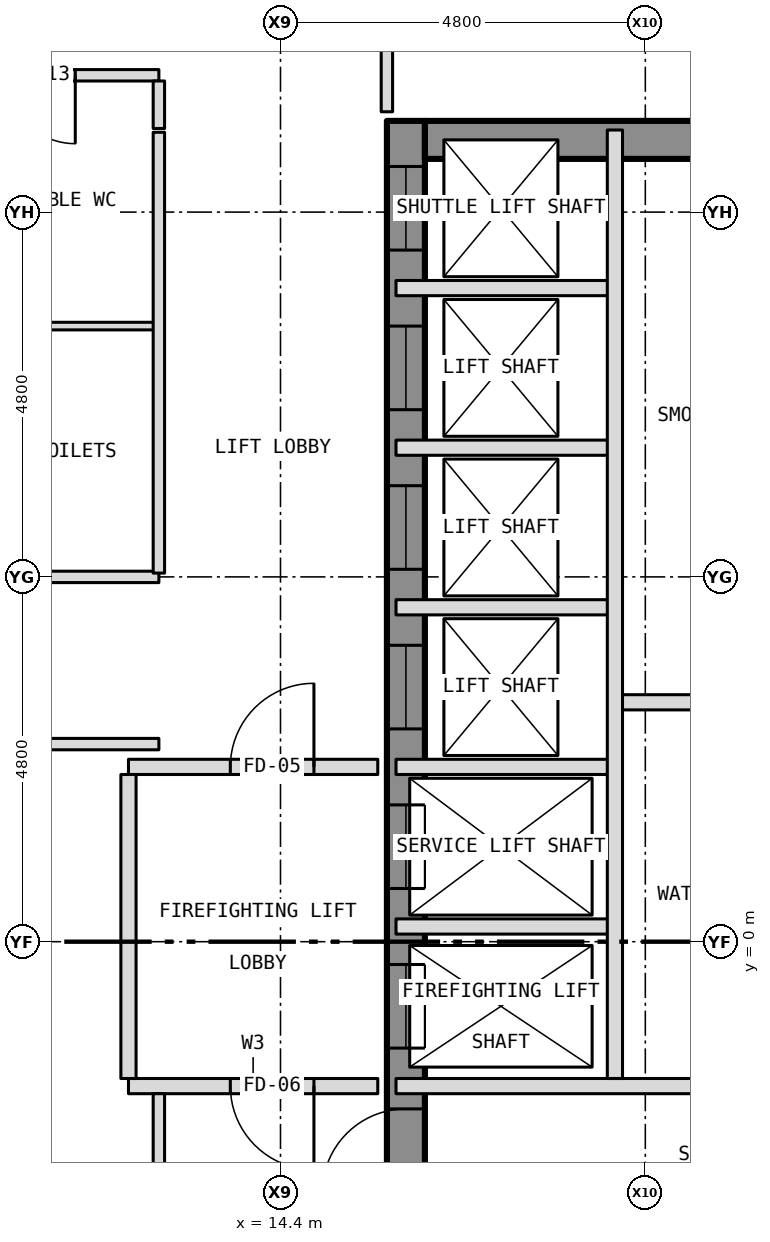
"""IFC4 building model, lengths in metres.
Left out: names, types, materials, properties, quantities, classifications, styles, units other than length and angle.
Written with IfcOpenShell. Run it as: python <this file> out.ifc"""

import sys

from ifc_helpers import new_model, si_unit, direction, frame, frame_2d, origin, place, context, subcontext, project, spatial, rectangle, extrude, element, fill, save


model = new_model("IFC4")
c1 = context("Model", 3, precision=1e-05, world=origin(), true_north=direction((0.0, 1.0)))
c2 = subcontext(c1, "Body", "Model", "MODEL_VIEW")
j1 = project(units=[si_unit("LENGTHUNIT", "METRE"), si_unit("PLANEANGLEUNIT", "RADIAN")], contexts=[c1])
p1 = place(None, origin())
s1 = spatial("IfcSite", under=j1, at=p1, CompositionType="ELEMENT")
p2 = place(p1, origin())
s2 = spatial("IfcBuilding", under=s1, at=p2, CompositionType="ELEMENT")
p3 = place(p2, frame((0.0, 0.0, 142.5)))
s3 = spatial("IfcBuildingStorey", under=s2, at=p3, CompositionType="ELEMENT", Elevation=142.5)
p4 = place(p3, frame((16.05, -10.8, 0.0), z_axis=(0.0, 0.0, 1.0), x_axis=(0.0, 1.0, 0.0)))
e1 = element("IfcWall", 1, at=p4, inside=s3, PredefinedType="SHEAR", context=c2, shape_type="SweptSolid", body=[
    extrude(rectangle(XDim=21.6, YDim=0.5, at=frame_2d((10.8, 0.0))), origin(), (0.0, 0.0, 1.0), 5.25),
])
p5 = place(p4, frame((9.4, 0.0, 0.0)))
e2 = element("IfcOpeningElement", 2, at=p5, cuts=e1, PredefinedType="OPENING", context=c2, shape_type="SweptSolid", body=[
    extrude(rectangle(XDim=1.1, YDim=2.1, at=frame_2d((0.55, 1.05))), frame((0.0, 0.262, 0.0), z_axis=(0.0, -1.0, 0.0), x_axis=(1.0, 0.0, 0.0)), (0.0, 0.0, 1.0), 0.524),
])
p6 = place(p4, frame((11.5, 0.0, 0.0)))
e3 = element("IfcOpeningElement", 3, at=p6, cuts=e1, PredefinedType="OPENING", context=c2, shape_type="SweptSolid", body=[
    extrude(rectangle(XDim=1.1, YDim=2.1, at=frame_2d((0.55, 1.05))), frame((0.0, 0.262, 0.0), z_axis=(0.0, -1.0, 0.0), x_axis=(1.0, 0.0, 0.0)), (0.0, 0.0, 1.0), 0.524),
])
p7 = place(p4, frame((13.6, 0.0, 0.0)))
e4 = element("IfcOpeningElement", 4, at=p7, cuts=e1, PredefinedType="OPENING", context=c2, shape_type="SweptSolid", body=[
    extrude(rectangle(XDim=1.1, YDim=2.1, at=frame_2d((0.55, 1.05))), frame((0.0, 0.262, 0.0), z_axis=(0.0, -1.0, 0.0), x_axis=(1.0, 0.0, 0.0)), (0.0, 0.0, 1.0), 0.524),
])
p8 = place(p4, frame((15.7, 0.0, 0.0)))
e5 = element("IfcOpeningElement", 5, at=p8, cuts=e1, PredefinedType="OPENING", context=c2, shape_type="SweptSolid", body=[
    extrude(rectangle(XDim=1.1, YDim=2.1, at=frame_2d((0.55, 1.05))), frame((0.0, 0.262, 0.0), z_axis=(0.0, -1.0, 0.0), x_axis=(1.0, 0.0, 0.0)), (0.0, 0.0, 1.0), 0.524),
])
p9 = place(p4, frame((17.8, 0.0, 0.0)))
e6 = element("IfcOpeningElement", 6, at=p9, cuts=e1, PredefinedType="OPENING", context=c2, shape_type="SweptSolid", body=[
    extrude(rectangle(XDim=1.1, YDim=2.1, at=frame_2d((0.55, 1.05))), frame((0.0, 0.262, 0.0), z_axis=(0.0, -1.0, 0.0), x_axis=(1.0, 0.0, 0.0)), (0.0, 0.0, 1.0), 0.524),
])
p10 = place(p4, frame((19.9, 0.0, 0.0)))
e7 = element("IfcOpeningElement", 7, at=p10, cuts=e1, PredefinedType="OPENING", context=c2, shape_type="SweptSolid", body=[
    extrude(rectangle(XDim=1.1, YDim=2.1, at=frame_2d((0.55, 1.05))), frame((0.0, 0.262, 0.0), z_axis=(0.0, -1.0, 0.0), x_axis=(1.0, 0.0, 0.0)), (0.0, 0.0, 1.0), 0.524),
])
p11 = place(p4, frame((5.642, 0.0, 0.0)))
e8 = element("IfcOpeningElement", 8, at=p11, cuts=e1, PredefinedType="OPENING", context=c2, shape_type="SweptSolid", body=[
    extrude(rectangle(XDim=1.1, YDim=2.1, at=frame_2d((0.55, 1.05))), frame((0.0, 0.262, 0.0), z_axis=(0.0, -1.0, 0.0), x_axis=(1.0, 0.0, 0.0)), (0.0, 0.0, 1.0), 0.524),
])
p12 = place(p4, frame((7.5, 0.0, 0.0)))
e9 = element("IfcOpeningElement", 9, at=p12, cuts=e1, PredefinedType="OPENING", context=c2, shape_type="SweptSolid", body=[
    extrude(rectangle(XDim=1.1, YDim=2.1, at=frame_2d((0.55, 1.05))), frame((0.0, 0.262, 0.0), z_axis=(0.0, -1.0, 0.0), x_axis=(1.0, 0.0, 0.0)), (0.0, 0.0, 1.0), 0.524),
])
p13 = place(p3, frame((16.3, 10.55, 0.0), z_axis=(0.0, 0.0, 1.0), x_axis=(1.0, 0.0, 0.0)))
e10 = element("IfcWall", 10, at=p13, inside=s3, PredefinedType="SHEAR", context=c2, shape_type="SweptSolid", body=[
    extrude(rectangle(XDim=4.8, YDim=0.5, at=frame_2d((2.4, 0.0))), origin(), (0.0, 0.0, 1.0), 5.25),
])
p14 = place(p3, frame((12.4, -1.9, 0.0), z_axis=(0.0, 0.0, 1.0), x_axis=(1.0, 0.0, 0.0)))
e11 = element("IfcWall", 11, at=p14, inside=s3, PredefinedType="PARTITIONING", context=c2, shape_type="SweptSolid", body=[
    extrude(rectangle(XDim=3.28, YDim=0.2, at=frame_2d((1.64, 0.0))), origin(), (0.0, 0.0, 1.0), 5.35),
])
p15 = place(p14, frame((1.34, 0.0, 0.0)))
e12 = element("IfcOpeningElement", 12, at=p15, cuts=e11, PredefinedType="OPENING", context=c2, shape_type="SweptSolid", body=[
    extrude(rectangle(XDim=1.1, YDim=2.1, at=frame_2d((0.55, 1.05))), frame((0.0, 0.112, 0.0), z_axis=(0.0, -1.0, 0.0), x_axis=(1.0, 0.0, 0.0)), (0.0, 0.0, 1.0), 0.224),
])
p16 = place(p3, frame((15.92, -1.9, 0.0), z_axis=(0.0, 0.0, 1.0), x_axis=(1.0, 0.0, 0.0)))
e13 = element("IfcWall", 13, at=p16, inside=s3, PredefinedType="PARTITIONING", context=c2, shape_type="SweptSolid", body=[
    extrude(rectangle(XDim=5.56, YDim=0.2, at=frame_2d((2.78, 0.0))), origin(), (0.0, 0.0, 1.0), 5.25),
])
p17 = place(p3, frame((15.92, 0.2, 0.0), z_axis=(0.0, 0.0, 1.0), x_axis=(1.0, 0.0, 0.0)))
e14 = element("IfcWall", 14, at=p17, inside=s3, PredefinedType="PARTITIONING", context=c2, shape_type="SweptSolid", body=[
    extrude(rectangle(XDim=2.88, YDim=0.2, at=frame_2d((1.44, 0.0))), origin(), (0.0, 0.0, 1.0), 5.25),
])
p18 = place(p3, frame((12.4, 2.3, 0.0), z_axis=(0.0, 0.0, 1.0), x_axis=(1.0, 0.0, 0.0)))
e15 = element("IfcWall", 15, at=p18, inside=s3, PredefinedType="PARTITIONING", context=c2, shape_type="SweptSolid", body=[
    extrude(rectangle(XDim=3.28, YDim=0.2, at=frame_2d((1.64, 0.0))), origin(), (0.0, 0.0, 1.0), 5.35),
])
p19 = place(p18, frame((1.34, 0.0, 0.0)))
e16 = element("IfcOpeningElement", 16, at=p19, cuts=e15, PredefinedType="OPENING", context=c2, shape_type="SweptSolid", body=[
    extrude(rectangle(XDim=1.1, YDim=2.1, at=frame_2d((0.55, 1.05))), frame((0.0, 0.112, 0.0), z_axis=(0.0, -1.0, 0.0), x_axis=(1.0, 0.0, 0.0)), (0.0, 0.0, 1.0), 0.224),
])
p20 = place(p3, frame((15.92, 2.3, 0.0), z_axis=(0.0, 0.0, 1.0), x_axis=(1.0, 0.0, 0.0)))
e17 = element("IfcWall", 17, at=p20, inside=s3, PredefinedType="PARTITIONING", context=c2, shape_type="SweptSolid", body=[
    extrude(rectangle(XDim=2.88, YDim=0.2, at=frame_2d((1.44, 0.0))), origin(), (0.0, 0.0, 1.0), 5.25),
])
p21 = place(p3, frame((9.7, 2.6, 0.0), z_axis=(0.0, 0.0, 1.0), x_axis=(1.0, 0.0, 0.0)))
e18 = element("IfcWall", 18, at=p21, inside=s3, PredefinedType="PARTITIONING", context=c2, shape_type="SweptSolid", body=[
    extrude(rectangle(XDim=3.1, YDim=0.15, at=frame_2d((1.55, 0.0))), origin(), (0.0, 0.0, 1.0), 5.35),
])
p22 = place(p3, frame((18.8, 3.15, 0.0), z_axis=(0.0, 0.0, 1.0), x_axis=(1.0, 0.0, 0.0)))
e19 = element("IfcWall", 19, at=p22, inside=s3, PredefinedType="PARTITIONING", context=c2, shape_type="SweptSolid", body=[
    extrude(rectangle(XDim=2.68, YDim=0.2, at=frame_2d((1.34, 0.0))), origin(), (0.0, 0.0, 1.0), 5.25),
])
p23 = place(p3, frame((15.92, 4.4, 0.0), z_axis=(0.0, 0.0, 1.0), x_axis=(1.0, 0.0, 0.0)))
e20 = element("IfcWall", 20, at=p23, inside=s3, PredefinedType="PARTITIONING", context=c2, shape_type="SweptSolid", body=[
    extrude(rectangle(XDim=2.88, YDim=0.2, at=frame_2d((1.44, 0.0))), origin(), (0.0, 0.0, 1.0), 5.25),
])
p24 = place(p3, frame((9.7, 4.8, 0.0), z_axis=(0.0, 0.0, 1.0), x_axis=(1.0, 0.0, 0.0)))
e21 = element("IfcWall", 21, at=p24, inside=s3, PredefinedType="PARTITIONING", context=c2, shape_type="SweptSolid", body=[
    extrude(rectangle(XDim=3.1, YDim=0.15, at=frame_2d((1.55, 0.0))), origin(), (0.0, 0.0, 1.0), 5.35),
])
p25 = place(p3, frame((15.92, 6.5, 0.0), z_axis=(0.0, 0.0, 1.0), x_axis=(1.0, 0.0, 0.0)))
e22 = element("IfcWall", 22, at=p25, inside=s3, PredefinedType="PARTITIONING", context=c2, shape_type="SweptSolid", body=[
    extrude(rectangle(XDim=2.88, YDim=0.2, at=frame_2d((1.44, 0.0))), origin(), (0.0, 0.0, 1.0), 5.25),
])
p26 = place(p3, frame((9.7, 8.1, 0.0), z_axis=(0.0, 0.0, 1.0), x_axis=(1.0, 0.0, 0.0)))
e23 = element("IfcWall", 23, at=p26, inside=s3, PredefinedType="PARTITIONING", context=c2, shape_type="SweptSolid", body=[
    extrude(rectangle(XDim=3.1, YDim=0.1, at=frame_2d((1.55, 0.0))), origin(), (0.0, 0.0, 1.0), 5.35),
])
p27 = place(p3, frame((15.92, 8.6, 0.0), z_axis=(0.0, 0.0, 1.0), x_axis=(1.0, 0.0, 0.0)))
e24 = element("IfcWall", 24, at=p27, inside=s3, PredefinedType="PARTITIONING", context=c2, shape_type="SweptSolid", body=[
    extrude(rectangle(XDim=2.88, YDim=0.2, at=frame_2d((1.44, 0.0))), origin(), (0.0, 0.0, 1.0), 5.25),
])
p28 = place(p3, frame((9.7, 11.4, 0.0), z_axis=(0.0, 0.0, 1.0), x_axis=(1.0, 0.0, 0.0)))
e25 = element("IfcWall", 25, at=p28, inside=s3, PredefinedType="PARTITIONING", context=c2, shape_type="SweptSolid", body=[
    extrude(rectangle(XDim=3.1, YDim=0.15, at=frame_2d((1.55, 0.0))), origin(), (0.0, 0.0, 1.0), 5.35),
])
p29 = place(p28, frame((1.1, 0.0, 0.0)))
e26 = element("IfcOpeningElement", 26, at=p29, cuts=e25, PredefinedType="OPENING", context=c2, shape_type="SweptSolid", body=[
    extrude(rectangle(XDim=0.9, YDim=2.1, at=frame_2d((0.45, 1.05))), frame((0.0, 0.087, 0.0), z_axis=(0.0, -1.0, 0.0), x_axis=(1.0, 0.0, 0.0)), (0.0, 0.0, 1.0), 0.174),
])
p30 = place(p3, frame((12.4, -1.8, 0.0), z_axis=(0.0, 0.0, 1.0), x_axis=(0.0, 1.0, 0.0)))
e27 = element("IfcWall", 27, at=p30, inside=s3, PredefinedType="PARTITIONING", context=c2, shape_type="SweptSolid", body=[
    extrude(rectangle(XDim=4.0, YDim=0.2, at=frame_2d((2.0, 0.0))), origin(), (0.0, 0.0, 1.0), 5.35),
])
p31 = place(p3, frame((12.8, -11.325, 0.0), z_axis=(0.0, 0.0, 1.0), x_axis=(0.0, 1.0, 0.0)))
e28 = element("IfcWall", 28, at=p31, inside=s3, PredefinedType="PARTITIONING", context=c2, shape_type="SweptSolid", body=[
    extrude(rectangle(XDim=9.325, YDim=0.15, at=frame_2d((4.663, 0.0))), origin(), (0.0, 0.0, 1.0), 5.35),
])
p32 = place(p3, frame((12.8, 4.85, 0.0), z_axis=(0.0, 0.0, 1.0), x_axis=(0.0, 1.0, 0.0)))
e29 = element("IfcWall", 29, at=p32, inside=s3, PredefinedType="PARTITIONING", context=c2, shape_type="SweptSolid", body=[
    extrude(rectangle(XDim=5.8, YDim=0.15, at=frame_2d((2.9, 0.0))), origin(), (0.0, 0.0, 1.0), 5.35),
])
p33 = place(p3, frame((12.8, 10.7, 0.0), z_axis=(0.0, 0.0, 1.0), x_axis=(0.0, 1.0, 0.0)))
e30 = element("IfcWall", 30, at=p33, inside=s3, PredefinedType="PARTITIONING", context=c2, shape_type="SweptSolid", body=[
    extrude(rectangle(XDim=0.625, YDim=0.15, at=frame_2d((0.312, 0.0))), origin(), (0.0, 0.0, 1.0), 5.35),
])
p34 = place(p3, frame((15.8, 10.92, 0.0), z_axis=(0.0, 0.0, 1.0), x_axis=(0.0, 1.0, 0.0)))
e31 = element("IfcWall", 31, at=p34, inside=s3, PredefinedType="PARTITIONING", context=c2, shape_type="SweptSolid", body=[
    extrude(rectangle(XDim=2.605, YDim=0.15, at=frame_2d((1.302, 0.0))), origin(), (0.0, 0.0, 1.0), 5.35),
])
p35 = place(p34, frame((1.13, 0.0, 0.0)))
e32 = element("IfcOpeningElement", 32, at=p35, cuts=e31, PredefinedType="OPENING", context=c2, shape_type="SweptSolid", body=[
    extrude(rectangle(XDim=0.9, YDim=2.1, at=frame_2d((0.45, 1.05))), frame((0.0, 0.087, 0.0), z_axis=(0.0, -1.0, 0.0), x_axis=(1.0, 0.0, 0.0)), (0.0, 0.0, 1.0), 0.174),
])
p36 = place(p3, frame((18.8, -1.8, 0.0), z_axis=(0.0, 0.0, 1.0), x_axis=(0.0, 1.0, 0.0)))
e33 = element("IfcWall", 33, at=p36, inside=s3, PredefinedType="PARTITIONING", context=c2, shape_type="SweptSolid", body=[
    extrude(rectangle(XDim=12.48, YDim=0.2, at=frame_2d((6.24, 0.0))), origin(), (0.0, 0.0, 1.0), 5.25),
])
p37 = place(p5, origin())
e34 = element("IfcDoor", 34, at=p37, inside=s3, OperationType="SLIDING_TO_LEFT", PredefinedType="DOOR", context=c2, shape_type="SweptSolid", body=[
    extrude(rectangle(XDim=1.1, YDim=2.1, at=frame_2d((0.55, 1.05))), frame((0.0, 0.025, 0.0), z_axis=(0.0, -1.0, 0.0), x_axis=(1.0, 0.0, 0.0)), (0.0, 0.0, 1.0), 0.05),
])
fill(e2, e34)
p38 = place(p6, origin())
e35 = element("IfcDoor", 35, at=p38, inside=s3, OperationType="SLIDING_TO_LEFT", PredefinedType="DOOR", context=c2, shape_type="SweptSolid", body=[
    extrude(rectangle(XDim=1.1, YDim=2.1, at=frame_2d((0.55, 1.05))), frame((0.0, 0.025, 0.0), z_axis=(0.0, -1.0, 0.0), x_axis=(1.0, 0.0, 0.0)), (0.0, 0.0, 1.0), 0.05),
])
fill(e3, e35)
p39 = place(p7, origin())
e36 = element("IfcDoor", 36, at=p39, inside=s3, OperationType="SLIDING_TO_LEFT", PredefinedType="DOOR", context=c2, shape_type="SweptSolid", body=[
    extrude(rectangle(XDim=1.1, YDim=2.1, at=frame_2d((0.55, 1.05))), frame((0.0, 0.025, 0.0), z_axis=(0.0, -1.0, 0.0), x_axis=(1.0, 0.0, 0.0)), (0.0, 0.0, 1.0), 0.05),
])
fill(e4, e36)
p40 = place(p8, origin())
e37 = element("IfcDoor", 37, at=p40, inside=s3, OperationType="SLIDING_TO_LEFT", PredefinedType="DOOR", context=c2, shape_type="SweptSolid", body=[
    extrude(rectangle(XDim=1.1, YDim=2.1, at=frame_2d((0.55, 1.05))), frame((0.0, 0.025, 0.0), z_axis=(0.0, -1.0, 0.0), x_axis=(1.0, 0.0, 0.0)), (0.0, 0.0, 1.0), 0.05),
])
fill(e5, e37)
p41 = place(p9, origin())
e38 = element("IfcDoor", 38, at=p41, inside=s3, OperationType="SLIDING_TO_LEFT", PredefinedType="DOOR", context=c2, shape_type="SweptSolid", body=[
    extrude(rectangle(XDim=1.1, YDim=2.1, at=frame_2d((0.55, 1.05))), frame((0.0, 0.025, 0.0), z_axis=(0.0, -1.0, 0.0), x_axis=(1.0, 0.0, 0.0)), (0.0, 0.0, 1.0), 0.05),
])
fill(e6, e38)
p42 = place(p10, origin())
e39 = element("IfcDoor", 39, at=p42, inside=s3, OperationType="SLIDING_TO_LEFT", PredefinedType="DOOR", context=c2, shape_type="SweptSolid", body=[
    extrude(rectangle(XDim=1.1, YDim=2.1, at=frame_2d((0.55, 1.05))), frame((0.0, 0.025, 0.0), z_axis=(0.0, -1.0, 0.0), x_axis=(1.0, 0.0, 0.0)), (0.0, 0.0, 1.0), 0.05),
])
fill(e7, e39)
p43 = place(p12, origin())
e40 = element("IfcDoor", 40, at=p43, inside=s3, OperationType="SINGLE_SWING_LEFT", PredefinedType="DOOR", context=c2, shape_type="SweptSolid", body=[
    extrude(rectangle(XDim=1.1, YDim=2.1, at=frame_2d((0.55, 1.05))), frame((0.0, 0.025, 0.0), z_axis=(0.0, -1.0, 0.0), x_axis=(1.0, 0.0, 0.0)), (0.0, 0.0, 1.0), 0.05),
])
fill(e9, e40)
p44 = place(p19, origin())
e41 = element("IfcDoor", 41, at=p44, inside=s3, OperationType="SINGLE_SWING_RIGHT", PredefinedType="DOOR", context=c2, shape_type="SweptSolid", body=[
    extrude(rectangle(XDim=1.1, YDim=2.1, at=frame_2d((0.55, 1.05))), frame((0.0, 0.025, 0.0), z_axis=(0.0, -1.0, 0.0), x_axis=(1.0, 0.0, 0.0)), (0.0, 0.0, 1.0), 0.05),
])
fill(e16, e41)
p45 = place(p15, origin())
e42 = element("IfcDoor", 42, at=p45, inside=s3, OperationType="SINGLE_SWING_RIGHT", PredefinedType="DOOR", context=c2, shape_type="SweptSolid", body=[
    extrude(rectangle(XDim=1.1, YDim=2.1, at=frame_2d((0.55, 1.05))), frame((0.0, 0.025, 0.0), z_axis=(0.0, -1.0, 0.0), x_axis=(1.0, 0.0, 0.0)), (0.0, 0.0, 1.0), 0.05),
])
fill(e12, e42)
p46 = place(p29, origin())
e43 = element("IfcDoor", 43, at=p46, inside=s3, OperationType="SINGLE_SWING_RIGHT", PredefinedType="DOOR", context=c2, shape_type="SweptSolid", body=[
    extrude(rectangle(XDim=0.9, YDim=2.1, at=frame_2d((0.45, 1.05))), frame((0.0, 0.025, 0.0), z_axis=(0.0, -1.0, 0.0), x_axis=(1.0, 0.0, 0.0)), (0.0, 0.0, 1.0), 0.05),
])
fill(e26, e43)
save(model, sys.argv[1])
